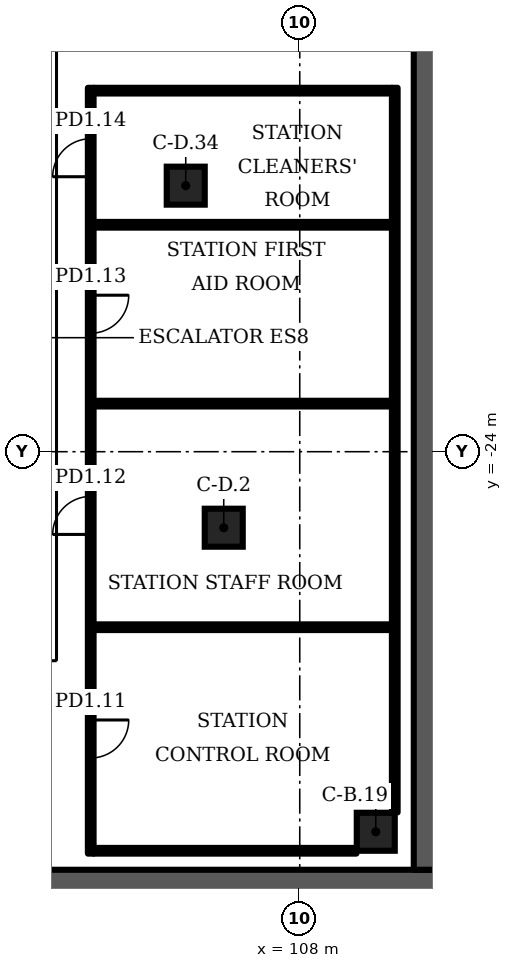
"""IFC4 building model, lengths in metres.
Left out: names, types, materials, properties, quantities, classifications, styles, units other than length and angle.
Written with IfcOpenShell. Run it as: python <this file> out.ifc"""

import sys

from ifc_helpers import new_model, si_unit, direction, frame, frame_2d, origin, origin_2d, place, context, subcontext, project, spatial, rectangle, extrude, element, fill, save


model = new_model("IFC4")
c1 = context("Model", 3, precision=1e-05, world=origin(), true_north=direction((0.0, 1.0)))
c2 = subcontext(c1, "Body", "Model", "MODEL_VIEW")
j1 = project(units=[si_unit("LENGTHUNIT", "METRE"), si_unit("PLANEANGLEUNIT", "RADIAN")], contexts=[c1])
p1 = place(None, origin())
s1 = spatial("IfcSite", under=j1, at=p1, CompositionType="ELEMENT")
p2 = place(p1, origin())
s2 = spatial("IfcBuilding", under=s1, at=p2, CompositionType="ELEMENT")
p3 = place(p2, frame((0.0, 0.0, -7.2)))
s3 = spatial("IfcBuildingStorey", under=s2, at=p3, CompositionType="ELEMENT", Elevation=-7.2)
p4 = place(p3, frame((-16.0, -35.5, 0.0), z_axis=(0.0, 0.0, 1.0), x_axis=(1.0, 0.0, 0.0)))
e1 = element("IfcWall", 1, at=p4, inside=s3, PredefinedType="SOLIDWALL", context=c2, shape_type="SweptSolid", body=[
    extrude(rectangle(XDim=128.0, YDim=1.0, at=frame_2d((64.0, 0.0))), origin(), (0.0, 0.0, 1.0), 6.6),
])
p5 = place(p3, frame((111.5, -35.0, 0.0), z_axis=(0.0, 0.0, 1.0), x_axis=(0.0, 1.0, 0.0)))
e2 = element("IfcWall", 2, at=p5, inside=s3, PredefinedType="SOLIDWALL", context=c2, shape_type="SweptSolid", body=[
    extrude(rectangle(XDim=94.0, YDim=1.0, at=frame_2d((47.0, 0.0))), origin(), (0.0, 0.0, 1.0), 6.6),
])
for number, where, z_axis, x_axis in (
    (3, (106.0, -26.0, 0.0), (0.0, 0.0, 1.0), (1.0, 0.0, 0.0)),
    (4, (105.0, -17.0, 0.0), (0.0, 0.0, 1.0), (1.0, 0.0, 0.0)),
    (5, (110.0, -34.0, 0.0), (0.0, 0.0, 1.0), (1.0, 0.0, 0.0)),
):
    element("IfcColumn", number, at=place(p3, frame(where, z_axis=z_axis, x_axis=x_axis)), inside=s3, PredefinedType="COLUMN", context=c2, shape_type="SweptSolid", body=[
        extrude(rectangle(XDim=1.0, YDim=1.0, at=origin_2d()), origin(), (0.0, 0.0, 1.0), 7.2),
    ])
p6 = place(p3, frame((110.5, -33.49, 0.0), z_axis=(0.0, 0.0, 1.0), x_axis=(0.0, 1.0, 0.0)))
e6 = element("IfcWall", 6, at=p6, inside=s3, PredefinedType="PARTITIONING", context=c2, shape_type="SweptSolid", body=[
    extrude(rectangle(XDim=19.065, YDim=0.15, at=frame_2d((9.532, 0.0))), origin(), (0.0, 0.0, 1.0), 6.9),
])
p7 = place(p3, frame((102.575, -34.5, 0.0), z_axis=(0.0, 0.0, 1.0), x_axis=(1.0, 0.0, 0.0)))
e7 = element("IfcWall", 7, at=p7, inside=s3, PredefinedType="PARTITIONING", context=c2, shape_type="SweptSolid", body=[
    extrude(rectangle(XDim=6.915, YDim=0.15, at=frame_2d((3.458, 0.0))), origin(), (0.0, 0.0, 1.0), 6.9),
])
p8 = place(p3, frame((102.575, -28.618, 0.0), z_axis=(0.0, 0.0, 1.0), x_axis=(1.0, 0.0, 0.0)))
e8 = element("IfcWall", 8, at=p8, inside=s3, PredefinedType="PARTITIONING", context=c2, shape_type="SweptSolid", body=[
    extrude(rectangle(XDim=7.85, YDim=0.15, at=frame_2d((3.925, 0.0))), origin(), (0.0, 0.0, 1.0), 6.9),
])
p9 = place(p3, frame((102.5, -34.575, 0.0), z_axis=(0.0, 0.0, 1.0), x_axis=(0.0, 1.0, 0.0)))
e9 = element("IfcWall", 9, at=p9, inside=s3, PredefinedType="PARTITIONING", context=c2, shape_type="SweptSolid", body=[
    extrude(rectangle(XDim=20.15, YDim=0.15, at=frame_2d((10.075, 0.0))), origin(), (0.0, 0.0, 1.0), 6.9),
])
p10 = place(p9, frame((2.516, 0.0, 0.0)))
e10 = element("IfcOpeningElement", 10, at=p10, cuts=e9, PredefinedType="OPENING", context=c2, shape_type="SweptSolid", body=[
    extrude(rectangle(XDim=1.0, YDim=2.1, at=frame_2d((0.5, 1.05))), frame((0.0, 0.085, 0.0), z_axis=(0.0, -1.0, 0.0), x_axis=(1.0, 0.0, 0.0)), (0.0, 0.0, 1.0), 0.17),
])
p11 = place(p9, frame((8.398, 0.0, 0.0)))
e11 = element("IfcOpeningElement", 11, at=p11, cuts=e9, PredefinedType="OPENING", context=c2, shape_type="SweptSolid", body=[
    extrude(rectangle(XDim=1.0, YDim=2.1, at=frame_2d((0.5, 1.05))), frame((0.0, 0.085, 0.0), z_axis=(0.0, -1.0, 0.0), x_axis=(1.0, 0.0, 0.0)), (0.0, 0.0, 1.0), 0.17),
])
p12 = place(p9, frame((13.693, 0.0, 0.0)))
e12 = element("IfcOpeningElement", 12, at=p12, cuts=e9, PredefinedType="OPENING", context=c2, shape_type="SweptSolid", body=[
    extrude(rectangle(XDim=1.0, YDim=2.1, at=frame_2d((0.5, 1.05))), frame((0.0, 0.085, 0.0), z_axis=(0.0, -1.0, 0.0), x_axis=(1.0, 0.0, 0.0)), (0.0, 0.0, 1.0), 0.17),
])
p13 = place(p9, frame((17.81, 0.0, 0.0)))
e13 = element("IfcOpeningElement", 13, at=p13, cuts=e9, PredefinedType="OPENING", context=c2, shape_type="SweptSolid", body=[
    extrude(rectangle(XDim=1.0, YDim=2.1, at=frame_2d((0.5, 1.05))), frame((0.0, 0.085, 0.0), z_axis=(0.0, -1.0, 0.0), x_axis=(1.0, 0.0, 0.0)), (0.0, 0.0, 1.0), 0.17),
])
for number, where, z_axis, x_axis in (
    (14, (102.575, -22.735, 0.0), (0.0, 0.0, 1.0), (1.0, 0.0, 0.0)),
    (15, (102.575, -18.029, 0.0), (0.0, 0.0, 1.0), (1.0, 0.0, 0.0)),
    (16, (102.575, -14.5, 0.0), (0.0, 0.0, 1.0), (1.0, 0.0, 0.0)),
):
    element("IfcWall", number, at=place(p3, frame(where, z_axis=z_axis, x_axis=x_axis)), inside=s3, PredefinedType="PARTITIONING", context=c2, shape_type="SweptSolid", body=[
        extrude(rectangle(XDim=7.85, YDim=0.15, at=frame_2d((3.925, 0.0))), origin(), (0.0, 0.0, 1.0), 6.9),
    ])
p14 = place(p10, origin())
e17 = element("IfcDoor", 17, at=p14, inside=s3, OperationType="SINGLE_SWING_RIGHT", PredefinedType="DOOR", context=c2, shape_type="SweptSolid", body=[
    extrude(rectangle(XDim=1.0, YDim=2.1, at=frame_2d((0.5, 1.05))), frame((0.0, 0.025, 0.0), z_axis=(0.0, -1.0, 0.0), x_axis=(1.0, 0.0, 0.0)), (0.0, 0.0, 1.0), 0.05),
])
fill(e10, e17)
p15 = place(p11, origin())
e18 = element("IfcDoor", 18, at=p15, inside=s3, OperationType="SINGLE_SWING_LEFT", PredefinedType="DOOR", context=c2, shape_type="SweptSolid", body=[
    extrude(rectangle(XDim=1.0, YDim=2.1, at=frame_2d((0.5, 1.05))), frame((0.0, 0.025, 0.0), z_axis=(0.0, -1.0, 0.0), x_axis=(1.0, 0.0, 0.0)), (0.0, 0.0, 1.0), 0.05),
])
fill(e11, e18)
p16 = place(p12, origin())
e19 = element("IfcDoor", 19, at=p16, inside=s3, OperationType="SINGLE_SWING_RIGHT", PredefinedType="DOOR", context=c2, shape_type="SweptSolid", body=[
    extrude(rectangle(XDim=1.0, YDim=2.1, at=frame_2d((0.5, 1.05))), frame((0.0, 0.025, 0.0), z_axis=(0.0, -1.0, 0.0), x_axis=(1.0, 0.0, 0.0)), (0.0, 0.0, 1.0), 0.05),
])
fill(e12, e19)
p17 = place(p13, origin())
e20 = element("IfcDoor", 20, at=p17, inside=s3, OperationType="SINGLE_SWING_LEFT", PredefinedType="DOOR", context=c2, shape_type="SweptSolid", body=[
    extrude(rectangle(XDim=1.0, YDim=2.1, at=frame_2d((0.5, 1.05))), frame((0.0, 0.025, 0.0), z_axis=(0.0, -1.0, 0.0), x_axis=(1.0, 0.0, 0.0)), (0.0, 0.0, 1.0), 0.05),
])
fill(e13, e20)
save(model, sys.argv[1])
